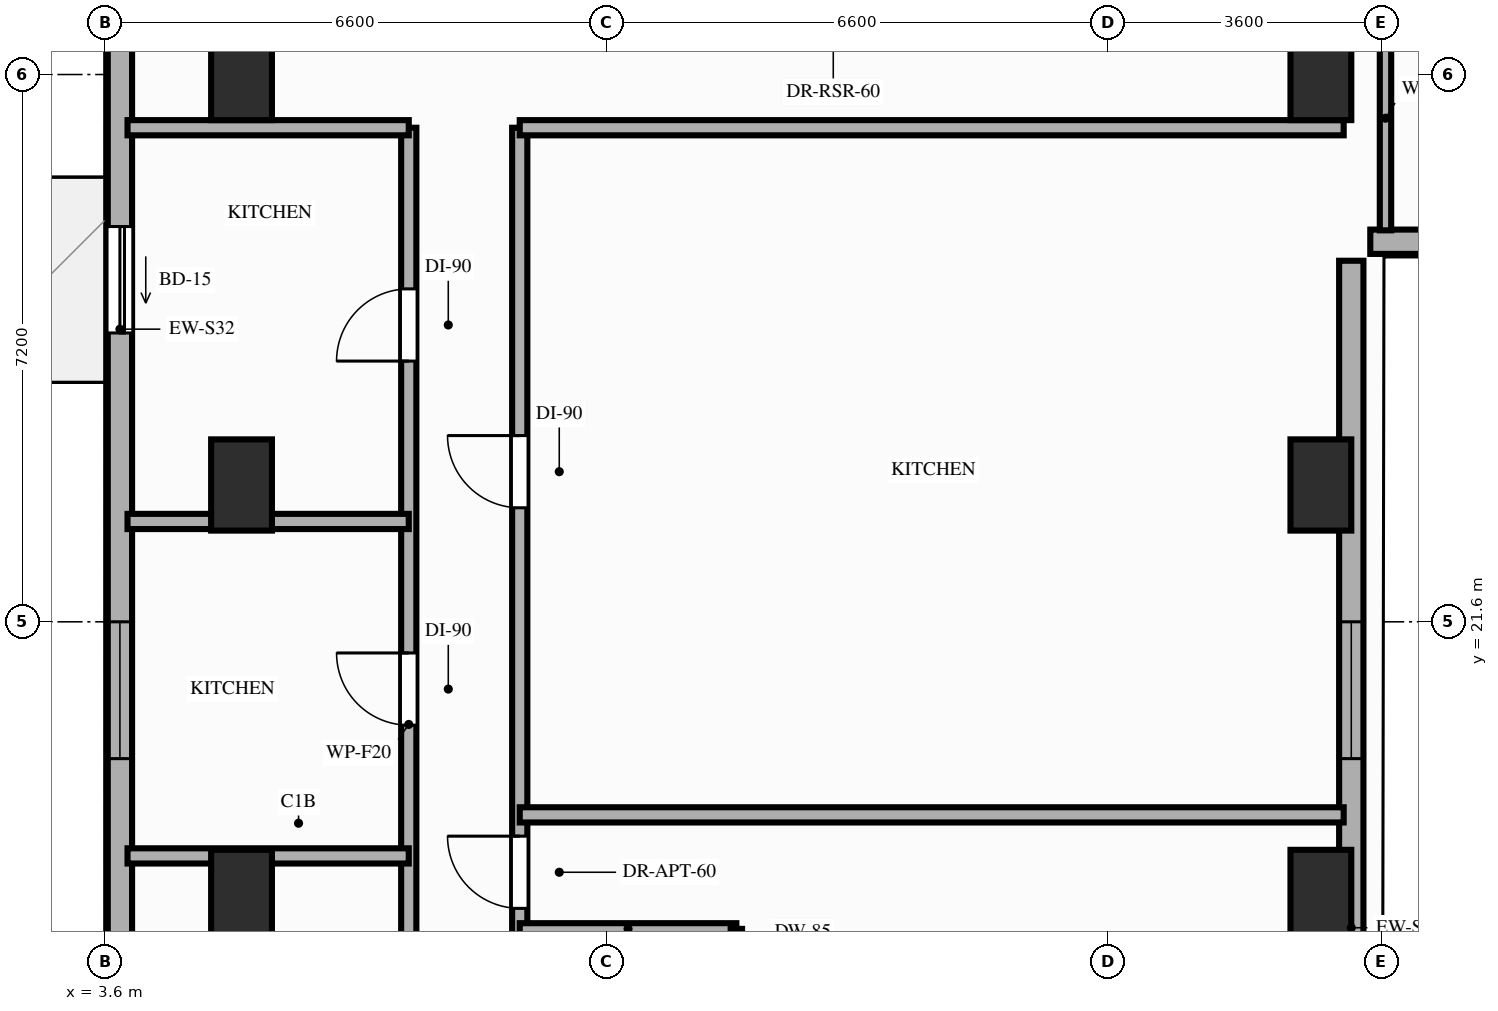
"""IFC4 building model, lengths in metres.
Left out: names, types, materials, properties, quantities, classifications, styles, units other than length and angle.
Written with IfcOpenShell. Run it as: python <this file> out.ifc"""

import sys

from ifc_helpers import new_model, si_unit, direction, frame, frame_2d, origin, origin_2d, place, context, subcontext, project, spatial, rectangle, extrude, element, fill, save


model = new_model("IFC4")
c1 = context("Model", 3, precision=1e-05, world=origin(), true_north=direction((0.0, 1.0)))
c2 = subcontext(c1, "Body", "Model", "MODEL_VIEW")
j1 = project(units=[si_unit("LENGTHUNIT", "METRE"), si_unit("PLANEANGLEUNIT", "RADIAN")], contexts=[c1])
p1 = place(None, origin())
s1 = spatial("IfcSite", under=j1, at=p1, CompositionType="ELEMENT")
p2 = place(p1, origin())
s2 = spatial("IfcBuilding", under=s1, at=p2, CompositionType="ELEMENT")
p3 = place(p2, frame((0.0, 0.0, 99.4)))
s3 = spatial("IfcBuildingStorey", under=s2, at=p3, CompositionType="ELEMENT", Elevation=99.4)
for number, where, z_axis, x_axis in (
    (1, (5.4, 18.0, 0.0), (0.0, 0.0, 1.0), (1.0, 0.0, 0.0)),
    (2, (19.6, 18.0, 0.0), (0.0, 0.0, 1.0), (1.0, 0.0, 0.0)),
    (3, (5.4, 23.4, 0.0), (0.0, 0.0, 1.0), (1.0, 0.0, 0.0)),
    (4, (19.6, 23.4, 0.0), (0.0, 0.0, 1.0), (1.0, 0.0, 0.0)),
    (5, (5.4, 28.8, 0.0), (0.0, 0.0, 1.0), (1.0, 0.0, 0.0)),
    (6, (19.6, 28.8, 0.0), (0.0, 0.0, 1.0), (1.0, 0.0, 0.0)),
):
    element("IfcColumn", number, at=place(p3, frame(where, z_axis=z_axis, x_axis=x_axis)), inside=s3, PredefinedType="COLUMN", context=c2, shape_type="SweptSolid", body=[
        extrude(rectangle(XDim=0.8, YDim=1.2, at=origin_2d()), origin(), (0.0, 0.0, 1.0), 3.2),
    ])
p4 = place(p3, frame((3.8, 42.1, 0.0), z_axis=(0.0, 0.0, 1.0), x_axis=(0.0, -1.0, 0.0)))
e7 = element("IfcWall", 7, at=p4, inside=s3, PredefinedType="STANDARD", context=c2, shape_type="SweptSolid", body=[
    extrude(rectangle(XDim=33.3, YDim=0.32, at=frame_2d((16.65, 0.0))), origin(), (0.0, 0.0, 1.0), 2.96),
])
p5 = place(p4, frame((26.1, 0.0, 0.0)))
e8 = element("IfcOpeningElement", 8, at=p5, cuts=e7, PredefinedType="OPENING", context=c2, shape_type="SweptSolid", body=[
    extrude(rectangle(XDim=1.4, YDim=2.1, at=frame_2d((0.7, 1.05))), frame((0.0, 0.17, 0.0), z_axis=(0.0, -1.0, 0.0), x_axis=(1.0, 0.0, 0.0)), (0.0, 0.0, 1.0), 0.34),
])
p6 = place(p4, frame((15.3, 0.0, 0.0)))
e9 = element("IfcOpeningElement", 9, at=p6, cuts=e7, PredefinedType="OPENING", context=c2, shape_type="SweptSolid", body=[
    extrude(rectangle(XDim=1.4, YDim=2.1, at=frame_2d((0.7, 1.05))), frame((0.0, 0.17, 0.0), z_axis=(0.0, -1.0, 0.0), x_axis=(1.0, 0.0, 0.0)), (0.0, 0.0, 1.0), 0.34),
])
p7 = place(p4, frame((30.53, 0.0, 0.85)))
e10 = element("IfcOpeningElement", 10, at=p7, cuts=e7, PredefinedType="OPENING", context=c2, shape_type="SweptSolid", body=[
    extrude(rectangle(XDim=1.8, YDim=1.75, at=frame_2d((0.9, 0.875))), frame((0.0, 0.17, 0.0), z_axis=(0.0, -1.0, 0.0), x_axis=(1.0, 0.0, 0.0)), (0.0, 0.0, 1.0), 0.34),
])
p8 = place(p4, frame((20.5, 0.0, 0.85)))
e11 = element("IfcOpeningElement", 11, at=p8, cuts=e7, PredefinedType="OPENING", context=c2, shape_type="SweptSolid", body=[
    extrude(rectangle(XDim=1.8, YDim=1.75, at=frame_2d((0.9, 0.875))), frame((0.0, 0.17, 0.0), z_axis=(0.0, -1.0, 0.0), x_axis=(1.0, 0.0, 0.0)), (0.0, 0.0, 1.0), 0.34),
])
p9 = place(p4, frame((9.9, 0.0, 0.85)))
e12 = element("IfcOpeningElement", 12, at=p9, cuts=e7, PredefinedType="OPENING", context=c2, shape_type="SweptSolid", body=[
    extrude(rectangle(XDim=1.8, YDim=1.75, at=frame_2d((0.9, 0.875))), frame((0.0, 0.17, 0.0), z_axis=(0.0, -1.0, 0.0), x_axis=(1.0, 0.0, 0.0)), (0.0, 0.0, 1.0), 0.34),
])
p10 = place(p4, frame((3.8, 0.0, 0.85)))
e13 = element("IfcOpeningElement", 13, at=p10, cuts=e7, PredefinedType="OPENING", context=c2, shape_type="SweptSolid", body=[
    extrude(rectangle(XDim=1.8, YDim=1.75, at=frame_2d((0.9, 0.875))), frame((0.0, 0.17, 0.0), z_axis=(0.0, -1.0, 0.0), x_axis=(1.0, 0.0, 0.0)), (0.0, 0.0, 1.0), 0.34),
])
p11 = place(p3, frame((20.0, 8.8, 0.0), z_axis=(0.0, 0.0, 1.0), x_axis=(0.0, 1.0, 0.0)))
e14 = element("IfcWall", 14, at=p11, inside=s3, PredefinedType="STANDARD", context=c2, shape_type="SweptSolid", body=[
    extrude(rectangle(XDim=17.55, YDim=0.32, at=frame_2d((8.775, 0.0))), origin(), (0.0, 0.0, 1.0), 2.35),
])
p12 = place(p11, frame((7.22, 0.0, 0.85)))
e15 = element("IfcOpeningElement", 15, at=p12, cuts=e14, PredefinedType="OPENING", context=c2, shape_type="SweptSolid", body=[
    extrude(rectangle(XDim=1.1, YDim=1.25, at=frame_2d((0.55, 0.625))), frame((0.0, 0.17, 0.0), z_axis=(0.0, -1.0, 0.0), x_axis=(1.0, 0.0, 0.0)), (0.0, 0.0, 1.0), 0.34),
])
p13 = place(p11, frame((11.0, 0.0, 0.85)))
e16 = element("IfcOpeningElement", 16, at=p13, cuts=e14, PredefinedType="OPENING", context=c2, shape_type="SweptSolid", body=[
    extrude(rectangle(XDim=1.8, YDim=1.25, at=frame_2d((0.9, 0.625))), frame((0.0, 0.17, 0.0), z_axis=(0.0, -1.0, 0.0), x_axis=(1.0, 0.0, 0.0)), (0.0, 0.0, 1.0), 0.34),
])
p14 = place(p3, frame((20.25, 26.6, 0.0), z_axis=(0.0, 0.0, 1.0), x_axis=(1.0, 0.0, 0.0)))
e17 = element("IfcWall", 17, at=p14, inside=s3, PredefinedType="STANDARD", context=c2, shape_type="SweptSolid", body=[
    extrude(rectangle(XDim=26.15, YDim=0.32, at=frame_2d((13.075, 0.0))), origin(), (0.0, 0.0, 1.0), 2.96),
])
p15 = place(p14, frame((14.43, 0.0, 0.0)))
e18 = element("IfcOpeningElement", 18, at=p15, cuts=e17, PredefinedType="OPENING", context=c2, shape_type="SweptSolid", body=[
    extrude(rectangle(XDim=1.4, YDim=2.1, at=frame_2d((0.7, 1.05))), frame((0.0, 0.17, 0.0), z_axis=(0.0, -1.0, 0.0), x_axis=(1.0, 0.0, 0.0)), (0.0, 0.0, 1.0), 0.34),
])
p16 = place(p14, frame((2.25, 0.0, 0.85)))
e19 = element("IfcOpeningElement", 19, at=p16, cuts=e17, PredefinedType="OPENING", context=c2, shape_type="SweptSolid", body=[
    extrude(rectangle(XDim=1.8, YDim=1.75, at=frame_2d((0.9, 0.875))), frame((0.0, 0.17, 0.0), z_axis=(0.0, -1.0, 0.0), x_axis=(1.0, 0.0, 0.0)), (0.0, 0.0, 1.0), 0.34),
])
p17 = place(p14, frame((7.75, 0.0, 0.85)))
e20 = element("IfcOpeningElement", 20, at=p17, cuts=e17, PredefinedType="OPENING", context=c2, shape_type="SweptSolid", body=[
    extrude(rectangle(XDim=1.8, YDim=1.75, at=frame_2d((0.9, 0.875))), frame((0.0, 0.17, 0.0), z_axis=(0.0, -1.0, 0.0), x_axis=(1.0, 0.0, 0.0)), (0.0, 0.0, 1.0), 0.34),
])
p18 = place(p14, frame((22.25, 0.0, 0.85)))
e21 = element("IfcOpeningElement", 21, at=p18, cuts=e17, PredefinedType="OPENING", context=c2, shape_type="SweptSolid", body=[
    extrude(rectangle(XDim=1.8, YDim=1.75, at=frame_2d((0.9, 0.875))), frame((0.0, 0.17, 0.0), z_axis=(0.0, -1.0, 0.0), x_axis=(1.0, 0.0, 0.0)), (0.0, 0.0, 1.0), 0.34),
])
p19 = place(p3, frame((7.6, 12.4, 0.0), z_axis=(0.0, 0.0, 1.0), x_axis=(0.0, 1.0, 0.0)))
e22 = element("IfcWall", 22, at=p19, inside=s3, PredefinedType="PARTITIONING", context=c2, shape_type="SweptSolid", body=[
    extrude(rectangle(XDim=15.7, YDim=0.2, at=frame_2d((7.85, 0.0))), origin(), (0.0, 0.0, 1.0), 2.35),
])
p20 = place(p19, frame((2.58, 0.0, 0.0)))
e23 = element("IfcOpeningElement", 23, at=p20, cuts=e22, PredefinedType="OPENING", context=c2, shape_type="SweptSolid", body=[
    extrude(rectangle(XDim=0.95, YDim=2.15, at=frame_2d((0.475, 1.075))), frame((0.0, 0.11, 0.0), z_axis=(0.0, -1.0, 0.0), x_axis=(1.0, 0.0, 0.0)), (0.0, 0.0, 1.0), 0.22),
])
p21 = place(p19, frame((7.84, 0.0, 0.0)))
e24 = element("IfcOpeningElement", 24, at=p21, cuts=e22, PredefinedType="OPENING", context=c2, shape_type="SweptSolid", body=[
    extrude(rectangle(XDim=0.95, YDim=2.15, at=frame_2d((0.475, 1.075))), frame((0.0, 0.11, 0.0), z_axis=(0.0, -1.0, 0.0), x_axis=(1.0, 0.0, 0.0)), (0.0, 0.0, 1.0), 0.22),
])
p22 = place(p19, frame((12.63, 0.0, 0.0)))
e25 = element("IfcOpeningElement", 25, at=p22, cuts=e22, PredefinedType="OPENING", context=c2, shape_type="SweptSolid", body=[
    extrude(rectangle(XDim=0.95, YDim=2.15, at=frame_2d((0.475, 1.075))), frame((0.0, 0.11, 0.0), z_axis=(0.0, -1.0, 0.0), x_axis=(1.0, 0.0, 0.0)), (0.0, 0.0, 1.0), 0.22),
])
p23 = place(p3, frame((9.06, 12.4, 0.0), z_axis=(0.0, 0.0, 1.0), x_axis=(0.0, 1.0, 0.0)))
e26 = element("IfcWall", 26, at=p23, inside=s3, PredefinedType="PARTITIONING", context=c2, shape_type="SweptSolid", body=[
    extrude(rectangle(XDim=15.7, YDim=0.2, at=frame_2d((7.85, 0.0))), origin(), (0.0, 0.0, 1.0), 2.35),
])
p24 = place(p23, frame((0.45, 0.0, 0.0)))
e27 = element("IfcOpeningElement", 27, at=p24, cuts=e26, PredefinedType="OPENING", context=c2, shape_type="SweptSolid", body=[
    extrude(rectangle(XDim=0.95, YDim=2.15, at=frame_2d((0.475, 1.075))), frame((0.0, 0.11, 0.0), z_axis=(0.0, -1.0, 0.0), x_axis=(1.0, 0.0, 0.0)), (0.0, 0.0, 1.0), 0.22),
])
p25 = place(p23, frame((2.08, 0.0, 0.0)))
e28 = element("IfcOpeningElement", 28, at=p25, cuts=e26, PredefinedType="OPENING", context=c2, shape_type="SweptSolid", body=[
    extrude(rectangle(XDim=0.95, YDim=2.1, at=frame_2d((0.475, 1.05))), frame((0.0, 0.11, 0.0), z_axis=(0.0, -1.0, 0.0), x_axis=(1.0, 0.0, 0.0)), (0.0, 0.0, 1.0), 0.22),
])
p26 = place(p23, frame((10.7, 0.0, 0.0)))
e29 = element("IfcOpeningElement", 29, at=p26, cuts=e26, PredefinedType="OPENING", context=c2, shape_type="SweptSolid", body=[
    extrude(rectangle(XDim=0.95, YDim=2.15, at=frame_2d((0.475, 1.075))), frame((0.0, 0.11, 0.0), z_axis=(0.0, -1.0, 0.0), x_axis=(1.0, 0.0, 0.0)), (0.0, 0.0, 1.0), 0.22),
])
p27 = place(p23, frame((5.43, 0.0, 0.0)))
e30 = element("IfcOpeningElement", 30, at=p27, cuts=e26, PredefinedType="OPENING", context=c2, shape_type="SweptSolid", body=[
    extrude(rectangle(XDim=0.95, YDim=2.15, at=frame_2d((0.475, 1.075))), frame((0.0, 0.11, 0.0), z_axis=(0.0, -1.0, 0.0), x_axis=(1.0, 0.0, 0.0)), (0.0, 0.0, 1.0), 0.22),
])
p28 = place(p3, frame((3.9, 28.1, 0.0), z_axis=(0.0, 0.0, 1.0), x_axis=(1.0, 0.0, 0.0)))
e31 = element("IfcWall", 31, at=p28, inside=s3, PredefinedType="PARTITIONING", context=c2, shape_type="SweptSolid", body=[
    extrude(rectangle(XDim=3.7, YDim=0.2, at=frame_2d((1.85, 0.0))), origin(), (0.0, 0.0, 1.0), 2.35),
])
p29 = place(p3, frame((9.06, 28.1, 0.0), z_axis=(0.0, 0.0, 1.0), x_axis=(1.0, 0.0, 0.0)))
e32 = element("IfcWall", 32, at=p29, inside=s3, PredefinedType="PARTITIONING", context=c2, shape_type="SweptSolid", body=[
    extrude(rectangle(XDim=10.84, YDim=0.2, at=frame_2d((5.42, 0.0))), origin(), (0.0, 0.0, 1.0), 2.35),
])
p30 = place(p3, frame((20.45, 26.75, 0.0), z_axis=(0.0, 0.0, 1.0), x_axis=(0.0, 1.0, 0.0)))
e33 = element("IfcWall", 33, at=p30, inside=s3, PredefinedType="PARTITIONING", context=c2, shape_type="SweptSolid", body=[
    extrude(rectangle(XDim=2.95, YDim=0.15, at=frame_2d((1.475, 0.0))), origin(), (0.0, 0.0, 1.0), 2.35),
])
for number, where, z_axis, x_axis in (
    (34, (3.9, 18.52, 0.0), (0.0, 0.0, 1.0), (1.0, 0.0, 0.0)),
    (35, (3.9, 22.92, 0.0), (0.0, 0.0, 1.0), (1.0, 0.0, 0.0)),
):
    element("IfcWall", number, at=place(p3, frame(where, z_axis=z_axis, x_axis=x_axis)), inside=s3, PredefinedType="PARTITIONING", context=c2, shape_type="SweptSolid", body=[
        extrude(rectangle(XDim=3.7, YDim=0.2, at=frame_2d((1.85, 0.0))), origin(), (0.0, 0.0, 1.0), 2.35),
    ])
p31 = place(p3, frame((9.06, 19.06, 0.0), z_axis=(0.0, 0.0, 1.0), x_axis=(1.0, 0.0, 0.0)))
e36 = element("IfcWall", 36, at=p31, inside=s3, PredefinedType="PARTITIONING", context=c2, shape_type="SweptSolid", body=[
    extrude(rectangle(XDim=10.84, YDim=0.2, at=frame_2d((5.42, 0.0))), origin(), (0.0, 0.0, 1.0), 2.35),
])
p32 = place(p3, frame((9.06, 17.56, 0.0), z_axis=(0.0, 0.0, 1.0), x_axis=(1.0, 0.0, 0.0)))
e37 = element("IfcWall", 37, at=p32, inside=s3, PredefinedType="PARTITIONING", context=c2, shape_type="SweptSolid", body=[
    extrude(rectangle(XDim=2.85, YDim=0.15, at=frame_2d((1.425, 0.0))), origin(), (0.0, 0.0, 1.0), 2.96),
])
p33 = place(p3, frame((11.91, 15.61, 0.0), z_axis=(0.0, 0.0, 1.0), x_axis=(0.0, 1.0, 0.0)))
e38 = element("IfcWall", 38, at=p33, inside=s3, PredefinedType="PARTITIONING", context=c2, shape_type="SweptSolid", body=[
    extrude(rectangle(XDim=1.95, YDim=0.15, at=frame_2d((0.975, 0.0))), origin(), (0.0, 0.0, 1.0), 2.54),
])
p34 = place(p33, frame((0.82, 0.0, 0.0)))
e39 = element("IfcOpeningElement", 39, at=p34, cuts=e38, PredefinedType="OPENING", context=c2, shape_type="SweptSolid", body=[
    extrude(rectangle(XDim=0.85, YDim=2.1, at=frame_2d((0.425, 1.05))), frame((0.0, 0.085, 0.0), z_axis=(0.0, -1.0, 0.0), x_axis=(1.0, 0.0, 0.0)), (0.0, 0.0, 1.0), 0.17),
])
p35 = place(p6, origin())
e40 = element("IfcDoor", 40, at=p35, inside=s3, OperationType="SLIDING_TO_RIGHT", PredefinedType="DOOR", context=c2, shape_type="SweptSolid", body=[
    extrude(rectangle(XDim=1.4, YDim=2.1, at=frame_2d((0.7, 1.05))), frame((0.0, 0.025, 0.0), z_axis=(0.0, -1.0, 0.0), x_axis=(1.0, 0.0, 0.0)), (0.0, 0.0, 1.0), 0.05),
])
fill(e9, e40)
p36 = place(p8, origin())
e41 = element("IfcWindow", 41, at=p36, inside=s3, PartitioningType="SINGLE_PANEL", PredefinedType="WINDOW", context=c2, shape_type="SweptSolid", body=[
    extrude(rectangle(XDim=1.8, YDim=1.75, at=frame_2d((0.9, 0.875))), frame((0.0, 0.03, 0.0), z_axis=(0.0, -1.0, 0.0), x_axis=(1.0, 0.0, 0.0)), (0.0, 0.0, 1.0), 0.06),
])
fill(e11, e41)
p37 = place(p13, origin())
e42 = element("IfcWindow", 42, at=p37, inside=s3, PartitioningType="SINGLE_PANEL", PredefinedType="WINDOW", context=c2, shape_type="SweptSolid", body=[
    extrude(rectangle(XDim=1.8, YDim=1.25, at=frame_2d((0.9, 0.625))), frame((0.0, 0.03, 0.0), z_axis=(0.0, -1.0, 0.0), x_axis=(1.0, 0.0, 0.0)), (0.0, 0.0, 1.0), 0.06),
])
fill(e16, e42)
p38 = place(p21, origin())
e43 = element("IfcDoor", 43, at=p38, inside=s3, OperationType="SINGLE_SWING_RIGHT", PredefinedType="DOOR", context=c2, shape_type="SweptSolid", body=[
    extrude(rectangle(XDim=0.95, YDim=2.15, at=frame_2d((0.475, 1.075))), frame((0.0, 0.025, 0.0), z_axis=(0.0, -1.0, 0.0), x_axis=(1.0, 0.0, 0.0)), (0.0, 0.0, 1.0), 0.05),
])
fill(e24, e43)
p39 = place(p22, origin())
e44 = element("IfcDoor", 44, at=p39, inside=s3, OperationType="SINGLE_SWING_LEFT", PredefinedType="DOOR", context=c2, shape_type="SweptSolid", body=[
    extrude(rectangle(XDim=0.95, YDim=2.15, at=frame_2d((0.475, 1.075))), frame((0.0, 0.025, 0.0), z_axis=(0.0, -1.0, 0.0), x_axis=(1.0, 0.0, 0.0)), (0.0, 0.0, 1.0), 0.05),
])
fill(e25, e44)
p40 = place(p26, origin())
e45 = element("IfcDoor", 45, at=p40, inside=s3, OperationType="SINGLE_SWING_RIGHT", PredefinedType="DOOR", context=c2, shape_type="SweptSolid", body=[
    extrude(rectangle(XDim=0.95, YDim=2.15, at=frame_2d((0.475, 1.075))), frame((0.0, 0.025, 0.0), z_axis=(0.0, -1.0, 0.0), x_axis=(1.0, 0.0, 0.0)), (0.0, 0.0, 1.0), 0.05),
])
fill(e29, e45)
p41 = place(p27, origin())
e46 = element("IfcDoor", 46, at=p41, inside=s3, OperationType="SINGLE_SWING_RIGHT", PredefinedType="DOOR", context=c2, shape_type="SweptSolid", body=[
    extrude(rectangle(XDim=0.95, YDim=2.15, at=frame_2d((0.475, 1.075))), frame((0.0, 0.025, 0.0), z_axis=(0.0, -1.0, 0.0), x_axis=(1.0, 0.0, 0.0)), (0.0, 0.0, 1.0), 0.05),
])
fill(e30, e46)
save(model, sys.argv[1])
